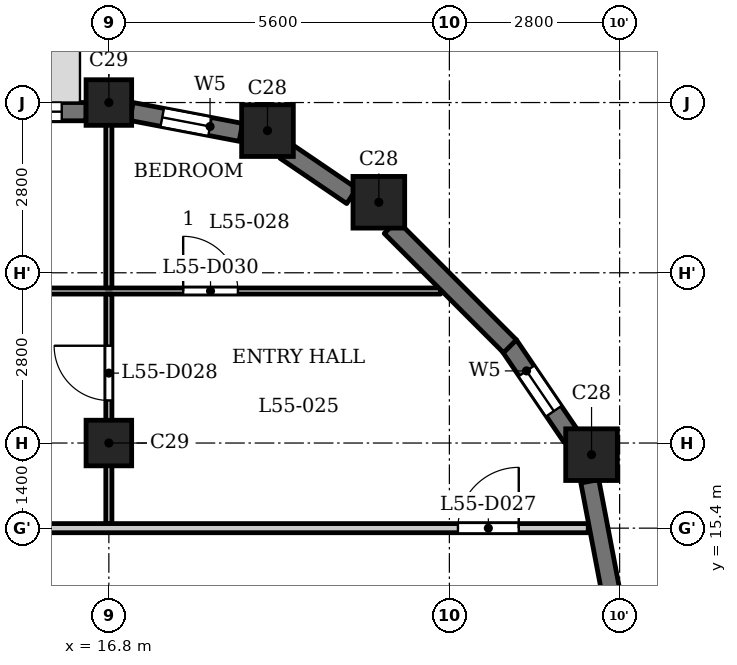
"""IFC4 building model, lengths in metres.
Left out: names, types, materials, properties, quantities, classifications, styles, units other than length and angle.
Written with IfcOpenShell. Run it as: python <this file> out.ifc"""

import sys

from ifc_helpers import new_model, si_unit, direction, frame, frame_2d, origin, origin_2d, place, context, subcontext, project, spatial, rectangle, extrude, element, fill, save


model = new_model("IFC4")
c1 = context("Model", 3, precision=1e-05, world=origin(), true_north=direction((0.0, 1.0)))
c2 = subcontext(c1, "Body", "Model", "MODEL_VIEW")
j1 = project(units=[si_unit("LENGTHUNIT", "METRE"), si_unit("PLANEANGLEUNIT", "RADIAN")], contexts=[c1])
p1 = place(None, origin())
s1 = spatial("IfcSite", under=j1, at=p1, CompositionType="ELEMENT")
p2 = place(p1, origin())
s2 = spatial("IfcBuilding", under=s1, at=p2, CompositionType="ELEMENT")
p3 = place(p2, frame((0.0, 0.0, 213.4)))
s3 = spatial("IfcBuildingStorey", under=s2, at=p3, CompositionType="ELEMENT", Elevation=213.4)
for number, where, z_axis, x_axis in (
    (1, (24.738, 16.609, 0.0), (0.0, 0.0, 1.0), (1.0, 0.0, 0.0)),
    (2, (21.24, 20.76, 0.0), (0.0, 0.0, 1.0), (1.0, 0.0, 0.0)),
    (3, (19.409, 21.938, 0.0), (0.0, 0.0, 1.0), (1.0, 0.0, 0.0)),
):
    element("IfcColumn", number, at=place(p3, frame(where, z_axis=z_axis, x_axis=x_axis)), inside=s3, PredefinedType="COLUMN", context=c2, shape_type="SweptSolid", body=[
        extrude(rectangle(XDim=0.85, YDim=0.85, at=origin_2d()), origin(), (0.0, 0.0, 1.0), 3.5),
    ])
for number, where, z_axis, x_axis in (
    (4, (16.8, 16.8, 0.0), (0.0, 0.0, 1.0), (1.0, 0.0, 0.0)),
    (5, (16.8, 22.4, 0.0), (0.0, 0.0, 1.0), (1.0, 0.0, 0.0)),
):
    element("IfcColumn", number, at=place(p3, frame(where, z_axis=z_axis, x_axis=x_axis)), inside=s3, PredefinedType="COLUMN", context=c2, shape_type="SweptSolid", body=[
        extrude(rectangle(XDim=0.75, YDim=0.75, at=origin_2d()), origin(), (0.0, 0.0, 1.0), 3.5),
    ])
p4 = place(p3, frame((25.053, 14.372, 0.0), z_axis=(0.0, 0.0, 1.0), x_axis=(-0.187442908742, 0.982275499014, 0.0)))
e6 = element("IfcWall", 6, at=p4, inside=s3, PredefinedType="SOLIDWALL", context=c2, shape_type="SweptSolid", body=[
    extrude(rectangle(XDim=1.831, YDim=0.3, at=frame_2d((0.916, 0.0))), origin(), (0.0, 0.0, 1.0), 2.5),
])
p5 = place(p3, frame((24.408, 16.898, 0.0), z_axis=(0.0, 0.0, 1.0), x_axis=(-0.562062033417, 0.827095079535, 0.0)))
e7 = element("IfcWall", 7, at=p5, inside=s3, PredefinedType="SOLIDWALL", context=c2, shape_type="SweptSolid", body=[
    extrude(rectangle(XDim=1.831, YDim=0.3, at=frame_2d((0.916, 0.0))), origin(), (0.0, 0.0, 1.0), 2.5),
])
p6 = place(p5, frame((0.516, 0.0, 0.6)))
e8 = element("IfcOpeningElement", 8, at=p6, cuts=e7, PredefinedType="OPENING", context=c2, shape_type="SweptSolid", body=[
    extrude(rectangle(XDim=0.8, YDim=1.55, at=frame_2d((0.4, 0.775))), frame((0.0, 0.16, 0.0), z_axis=(0.0, -1.0, 0.0), x_axis=(1.0, 0.0, 0.0)), (0.0, 0.0, 1.0), 0.32),
])
p7 = place(p3, frame((23.397, 18.391, 0.0), z_axis=(0.0, 0.0, 1.0), x_axis=(-0.707106781187, 0.707106781187, 0.0)))
e9 = element("IfcWall", 9, at=p7, inside=s3, PredefinedType="SOLIDWALL", context=c2, shape_type="SweptSolid", body=[
    extrude(rectangle(XDim=2.775, YDim=0.3, at=frame_2d((1.388, 0.0))), origin(), (0.0, 0.0, 1.0), 2.5),
])
p8 = place(p3, frame((20.796, 20.862, 0.0), z_axis=(0.0, 0.0, 1.0), x_axis=(-0.827035970432, 0.562149004813, 0.0)))
e10 = element("IfcWall", 10, at=p8, inside=s3, PredefinedType="SOLIDWALL", context=c2, shape_type="SweptSolid", body=[
    extrude(rectangle(XDim=1.327, YDim=0.3, at=frame_2d((0.664, 0.0))), origin(), (0.0, 0.0, 1.0), 2.5),
])
p9 = place(p3, frame((18.971, 21.91, 0.0), z_axis=(0.0, 0.0, 1.0), x_axis=(-0.982300037503, 0.187314271538, 0.0)))
e11 = element("IfcWall", 11, at=p9, inside=s3, PredefinedType="SOLIDWALL", context=c2, shape_type="SweptSolid", body=[
    extrude(rectangle(XDim=1.831, YDim=0.3, at=frame_2d((0.916, 0.0))), origin(), (0.0, 0.0, 1.0), 2.5),
])
p10 = place(p9, frame((0.516, 0.0, 0.6)))
e12 = element("IfcOpeningElement", 12, at=p10, cuts=e11, PredefinedType="OPENING", context=c2, shape_type="SweptSolid", body=[
    extrude(rectangle(XDim=0.8, YDim=1.55, at=frame_2d((0.4, 0.775))), frame((0.0, 0.16, 0.0), z_axis=(0.0, -1.0, 0.0), x_axis=(1.0, 0.0, 0.0)), (0.0, 0.0, 1.0), 0.32),
])
p11 = place(p3, frame((16.425, 22.25, 0.0), z_axis=(0.0, 0.0, 1.0), x_axis=(-1.0, 0.0, 0.0)))
e13 = element("IfcWall", 13, at=p11, inside=s3, PredefinedType="SOLIDWALL", context=c2, shape_type="SweptSolid", body=[
    extrude(rectangle(XDim=2.0, YDim=0.3, at=frame_2d((1.0, 0.0))), origin(), (0.0, 0.0, 1.0), 2.5),
])
p12 = place(p11, frame((0.4, 0.0, 0.6)))
e14 = element("IfcOpeningElement", 14, at=p12, cuts=e13, PredefinedType="OPENING", context=c2, shape_type="SweptSolid", body=[
    extrude(rectangle(XDim=1.2, YDim=1.55, at=frame_2d((0.6, 0.775))), frame((0.0, 0.16, 0.0), z_axis=(0.0, -1.0, 0.0), x_axis=(1.0, 0.0, 0.0)), (0.0, 0.0, 1.0), 0.32),
])
p13 = place(p3, frame((-24.684, 15.4, 0.0), z_axis=(0.0, 0.0, 1.0), x_axis=(1.0, 0.0, 0.0)))
e15 = element("IfcWall", 15, at=p13, inside=s3, PredefinedType="PARTITIONING", context=c2, shape_type="SweptSolid", body=[
    extrude(rectangle(XDim=49.368, YDim=0.15, at=frame_2d((24.684, 0.0))), origin(), (0.0, 0.0, 1.0), 3.2),
])
p14 = place(p13, frame((17.434, 0.0, 0.0)))
e16 = element("IfcOpeningElement", 16, at=p14, cuts=e15, PredefinedType="OPENING", context=c2, shape_type="SweptSolid", body=[
    extrude(rectangle(XDim=1.0, YDim=2.1, at=frame_2d((0.5, 1.05))), frame((0.0, 0.085, 0.0), z_axis=(0.0, -1.0, 0.0), x_axis=(1.0, 0.0, 0.0)), (0.0, 0.0, 1.0), 0.17),
])
p15 = place(p13, frame((28.634, 0.0, 0.0)))
e17 = element("IfcOpeningElement", 17, at=p15, cuts=e15, PredefinedType="OPENING", context=c2, shape_type="SweptSolid", body=[
    extrude(rectangle(XDim=1.0, YDim=2.1, at=frame_2d((0.5, 1.05))), frame((0.0, 0.085, 0.0), z_axis=(0.0, -1.0, 0.0), x_axis=(1.0, 0.0, 0.0)), (0.0, 0.0, 1.0), 0.17),
])
p16 = place(p13, frame((47.225, 0.0, 0.0)))
e18 = element("IfcOpeningElement", 18, at=p16, cuts=e15, PredefinedType="OPENING", context=c2, shape_type="SweptSolid", body=[
    extrude(rectangle(XDim=1.0, YDim=2.1, at=frame_2d((0.5, 1.05))), frame((0.0, 0.085, 0.0), z_axis=(0.0, -1.0, 0.0), x_axis=(1.0, 0.0, 0.0)), (0.0, 0.0, 1.0), 0.17),
])
p17 = place(p3, frame((-22.256, 19.3, 0.0), z_axis=(0.0, 0.0, 1.0), x_axis=(1.0, 0.0, 0.0)))
e19 = element("IfcWall", 19, at=p17, inside=s3, PredefinedType="PARTITIONING", context=c2, shape_type="SweptSolid", body=[
    extrude(rectangle(XDim=44.511, YDim=0.1, at=frame_2d((22.256, 0.0))), origin(), (0.0, 0.0, 1.0), 3.2),
])
p18 = place(p17, frame((11.606, 0.0, 0.0)))
e20 = element("IfcOpeningElement", 20, at=p18, cuts=e19, PredefinedType="OPENING", context=c2, shape_type="SweptSolid", body=[
    extrude(rectangle(XDim=0.9, YDim=2.1, at=frame_2d((0.45, 1.05))), frame((0.0, 0.06, 0.0), z_axis=(0.0, -1.0, 0.0), x_axis=(1.0, 0.0, 0.0)), (0.0, 0.0, 1.0), 0.12),
])
p19 = place(p17, frame((9.506, 0.0, 0.0)))
e21 = element("IfcOpeningElement", 21, at=p19, cuts=e19, PredefinedType="OPENING", context=c2, shape_type="SweptSolid", body=[
    extrude(rectangle(XDim=0.9, YDim=2.1, at=frame_2d((0.45, 1.05))), frame((0.0, 0.06, 0.0), z_axis=(0.0, -1.0, 0.0), x_axis=(1.0, 0.0, 0.0)), (0.0, 0.0, 1.0), 0.12),
])
p20 = place(p17, frame((20.806, 0.0, 0.0)))
e22 = element("IfcOpeningElement", 22, at=p20, cuts=e19, PredefinedType="OPENING", context=c2, shape_type="SweptSolid", body=[
    extrude(rectangle(XDim=0.8, YDim=2.1, at=frame_2d((0.4, 1.05))), frame((0.0, 0.06, 0.0), z_axis=(0.0, -1.0, 0.0), x_axis=(1.0, 0.0, 0.0)), (0.0, 0.0, 1.0), 0.12),
])
p21 = place(p17, frame((26.306, 0.0, 0.0)))
e23 = element("IfcOpeningElement", 23, at=p21, cuts=e19, PredefinedType="OPENING", context=c2, shape_type="SweptSolid", body=[
    extrude(rectangle(XDim=0.9, YDim=2.1, at=frame_2d((0.45, 1.05))), frame((0.0, 0.06, 0.0), z_axis=(0.0, -1.0, 0.0), x_axis=(1.0, 0.0, 0.0)), (0.0, 0.0, 1.0), 0.12),
])
p22 = place(p17, frame((40.278, 0.0, 0.0)))
e24 = element("IfcOpeningElement", 24, at=p22, cuts=e19, PredefinedType="OPENING", context=c2, shape_type="SweptSolid", body=[
    extrude(rectangle(XDim=0.9, YDim=2.1, at=frame_2d((0.45, 1.05))), frame((0.0, 0.06, 0.0), z_axis=(0.0, -1.0, 0.0), x_axis=(1.0, 0.0, 0.0)), (0.0, 0.0, 1.0), 0.12),
])
p23 = place(p17, frame((36.756, 0.0, 0.0)))
e25 = element("IfcOpeningElement", 25, at=p23, cuts=e19, PredefinedType="OPENING", context=c2, shape_type="SweptSolid", body=[
    extrude(rectangle(XDim=0.9, YDim=2.1, at=frame_2d((0.45, 1.05))), frame((0.0, 0.06, 0.0), z_axis=(0.0, -1.0, 0.0), x_axis=(1.0, 0.0, 0.0)), (0.0, 0.0, 1.0), 0.12),
])
p24 = place(p3, frame((16.8, 15.475, 0.0), z_axis=(0.0, 0.0, 1.0), x_axis=(0.0, 1.0, 0.0)))
e26 = element("IfcWall", 26, at=p24, inside=s3, PredefinedType="PARTITIONING", context=c2, shape_type="SweptSolid", body=[
    extrude(rectangle(XDim=3.775, YDim=0.1, at=frame_2d((1.887, 0.0))), origin(), (0.0, 0.0, 1.0), 2.55),
])
p25 = place(p24, frame((2.025, 0.0, 0.0)))
e27 = element("IfcOpeningElement", 27, at=p25, cuts=e26, PredefinedType="OPENING", context=c2, shape_type="SweptSolid", body=[
    extrude(rectangle(XDim=0.9, YDim=2.1, at=frame_2d((0.45, 1.05))), frame((0.0, 0.06, 0.0), z_axis=(0.0, -1.0, 0.0), x_axis=(1.0, 0.0, 0.0)), (0.0, 0.0, 1.0), 0.12),
])
p26 = place(p3, frame((16.8, 19.35, 0.0), z_axis=(0.0, 0.0, 1.0), x_axis=(0.0, 1.0, 0.0)))
e28 = element("IfcWall", 28, at=p26, inside=s3, PredefinedType="PARTITIONING", context=c2, shape_type="SweptSolid", body=[
    extrude(rectangle(XDim=2.96, YDim=0.1, at=frame_2d((1.48, 0.0))), origin(), (0.0, 0.0, 1.0), 2.55),
])
p27 = place(p16, origin())
e29 = element("IfcDoor", 29, at=p27, inside=s3, OperationType="SINGLE_SWING_LEFT", PredefinedType="DOOR", context=c2, shape_type="SweptSolid", body=[
    extrude(rectangle(XDim=1.0, YDim=2.1, at=frame_2d((0.5, 1.05))), frame((0.0, 0.025, 0.0), z_axis=(0.0, -1.0, 0.0), x_axis=(1.0, 0.0, 0.0)), (0.0, 0.0, 1.0), 0.05),
])
fill(e18, e29)
p28 = place(p25, origin())
e30 = element("IfcDoor", 30, at=p28, inside=s3, OperationType="SINGLE_SWING_LEFT", PredefinedType="DOOR", context=c2, shape_type="SweptSolid", body=[
    extrude(rectangle(XDim=0.9, YDim=2.1, at=frame_2d((0.45, 1.05))), frame((0.0, 0.025, 0.0), z_axis=(0.0, -1.0, 0.0), x_axis=(1.0, 0.0, 0.0)), (0.0, 0.0, 1.0), 0.05),
])
fill(e27, e30)
p29 = place(p22, origin())
e31 = element("IfcDoor", 31, at=p29, inside=s3, OperationType="SINGLE_SWING_RIGHT", PredefinedType="DOOR", context=c2, shape_type="SweptSolid", body=[
    extrude(rectangle(XDim=0.9, YDim=2.1, at=frame_2d((0.45, 1.05))), frame((0.0, 0.025, 0.0), z_axis=(0.0, -1.0, 0.0), x_axis=(1.0, 0.0, 0.0)), (0.0, 0.0, 1.0), 0.05),
])
fill(e24, e31)
p30 = place(p6, origin())
e32 = element("IfcWindow", 32, at=p30, inside=s3, PartitioningType="SINGLE_PANEL", PredefinedType="WINDOW", context=c2, shape_type="SweptSolid", body=[
    extrude(rectangle(XDim=0.8, YDim=1.55, at=frame_2d((0.4, 0.775))), frame((0.0, 0.03, 0.0), z_axis=(0.0, -1.0, 0.0), x_axis=(1.0, 0.0, 0.0)), (0.0, 0.0, 1.0), 0.06),
])
fill(e8, e32)
p31 = place(p10, origin())
e33 = element("IfcWindow", 33, at=p31, inside=s3, PartitioningType="SINGLE_PANEL", PredefinedType="WINDOW", context=c2, shape_type="SweptSolid", body=[
    extrude(rectangle(XDim=0.8, YDim=1.55, at=frame_2d((0.4, 0.775))), frame((0.0, 0.03, 0.0), z_axis=(0.0, -1.0, 0.0), x_axis=(1.0, 0.0, 0.0)), (0.0, 0.0, 1.0), 0.06),
])
fill(e12, e33)
p32 = place(p12, origin())
e34 = element("IfcWindow", 34, at=p32, inside=s3, PartitioningType="SINGLE_PANEL", PredefinedType="WINDOW", context=c2, shape_type="SweptSolid", body=[
    extrude(rectangle(XDim=1.2, YDim=1.55, at=frame_2d((0.6, 0.775))), frame((0.0, 0.03, 0.0), z_axis=(0.0, -1.0, 0.0), x_axis=(1.0, 0.0, 0.0)), (0.0, 0.0, 1.0), 0.06),
])
fill(e14, e34)
save(model, sys.argv[1])
